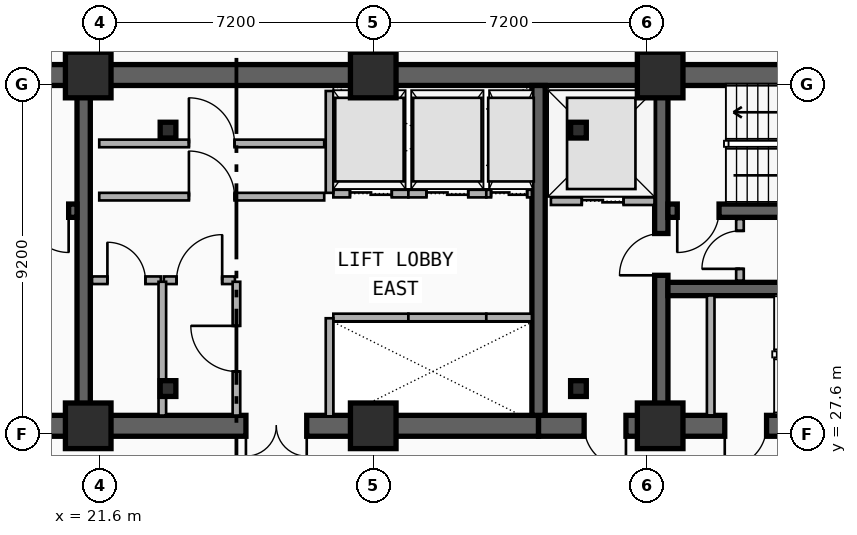
"""IFC4 building model, lengths in metres.
Left out: names, types, materials, properties, quantities, classifications, styles, units other than length and angle.
Written with IfcOpenShell. Run it as: python <this file> out.ifc"""

import sys

from ifc_helpers import new_model, si_unit, direction, frame, frame_2d, origin, origin_2d, place, context, subcontext, project, spatial, rectangle, i_section, extrude, element, fill, save


model = new_model("IFC4")
c1 = context("Model", 3, precision=1e-05, world=origin(), true_north=direction((0.0, 1.0)))
c2 = subcontext(c1, "Body", "Model", "MODEL_VIEW")
j1 = project(units=[si_unit("LENGTHUNIT", "METRE"), si_unit("PLANEANGLEUNIT", "RADIAN")], contexts=[c1])
p1 = place(None, origin())
s1 = spatial("IfcSite", under=j1, at=p1, CompositionType="ELEMENT")
p2 = place(p1, origin())
s2 = spatial("IfcBuilding", under=s1, at=p2, CompositionType="ELEMENT")
p3 = place(p2, frame((0.0, 0.0, 151.9)))
s3 = spatial("IfcBuildingStorey", under=s2, at=p3, CompositionType="ELEMENT", Elevation=151.9)
p4 = place(p3, frame((12.15, 37.05, 0.0), z_axis=(0.0, 0.0, 1.0), x_axis=(1.0, 0.0, 0.0)))
e1 = element("IfcWall", 1, at=p4, inside=s3, PredefinedType="SHEAR", context=c2, shape_type="SweptSolid", body=[
    extrude(rectangle(XDim=33.23, YDim=0.55, at=frame_2d((16.615, 0.0))), origin(), (0.0, 0.0, 1.0), 3.55),
])
p5 = place(p3, frame((21.18, 27.82, 0.0), z_axis=(0.0, 0.0, 1.0), x_axis=(-1.0, 0.0, 0.0)))
e2 = element("IfcWall", 2, at=p5, inside=s3, PredefinedType="SHEAR", context=c2, shape_type="SweptSolid", body=[
    extrude(rectangle(XDim=9.03, YDim=0.55, at=frame_2d((4.515, 0.0))), origin(), (0.0, 0.0, 1.0), 3.55),
])
p6 = place(p5, frame((2.68, 0.0, 0.0)))
e3 = element("IfcOpeningElement", 3, at=p6, cuts=e2, PredefinedType="OPENING", context=c2, shape_type="SweptSolid", body=[
    extrude(rectangle(XDim=1.1, YDim=2.15, at=frame_2d((0.55, 1.075))), frame((0.0, 0.285, 0.0), z_axis=(0.0, -1.0, 0.0), x_axis=(1.0, 0.0, 0.0)), (0.0, 0.0, 1.0), 0.57),
])
p7 = place(p3, frame((33.15, 27.82, 0.0), z_axis=(0.0, 0.0, 1.0), x_axis=(-1.0, 0.0, 0.0)))
e4 = element("IfcWall", 4, at=p7, inside=s3, PredefinedType="SHEAR", context=c2, shape_type="SweptSolid", body=[
    extrude(rectangle(XDim=11.97, YDim=0.55, at=frame_2d((5.985, 0.0))), origin(), (0.0, 0.0, 1.0), 3.55),
])
p8 = place(p7, frame((6.1, 0.0, 0.0)))
e5 = element("IfcOpeningElement", 5, at=p8, cuts=e4, PredefinedType="OPENING", context=c2, shape_type="SweptSolid", body=[
    extrude(rectangle(XDim=1.6, YDim=2.2, at=frame_2d((0.8, 1.1))), frame((0.0, 0.285, 0.0), z_axis=(0.0, -1.0, 0.0), x_axis=(1.0, 0.0, 0.0)), (0.0, 0.0, 1.0), 0.57),
])
p9 = place(p3, frame((45.38, 27.82, 0.0), z_axis=(0.0, 0.0, 1.0), x_axis=(-1.0, 0.0, 0.0)))
e6 = element("IfcWall", 6, at=p9, inside=s3, PredefinedType="SHEAR", context=c2, shape_type="SweptSolid", body=[
    extrude(rectangle(XDim=12.23, YDim=0.55, at=frame_2d((6.115, 0.0))), origin(), (0.0, 0.0, 1.0), 3.55),
])
p10 = place(p9, frame((9.93, 0.0, 0.0)))
e7 = element("IfcOpeningElement", 7, at=p10, cuts=e6, PredefinedType="OPENING", context=c2, shape_type="SweptSolid", body=[
    extrude(rectangle(XDim=1.1, YDim=2.15, at=frame_2d((0.55, 1.075))), frame((0.0, 0.285, 0.0), z_axis=(0.0, -1.0, 0.0), x_axis=(1.0, 0.0, 0.0)), (0.0, 0.0, 1.0), 0.57),
])
p11 = place(p9, frame((6.23, 0.0, 0.0)))
e8 = element("IfcOpeningElement", 8, at=p11, cuts=e6, PredefinedType="OPENING", context=c2, shape_type="SweptSolid", body=[
    extrude(rectangle(XDim=1.1, YDim=2.15, at=frame_2d((0.55, 1.075))), frame((0.0, 0.285, 0.0), z_axis=(0.0, -1.0, 0.0), x_axis=(1.0, 0.0, 0.0)), (0.0, 0.0, 1.0), 0.57),
])
for number, where, z_axis, x_axis in (
    (9, (21.18, 28.095, 0.0), (0.0, 0.0, 1.0), (0.0, 1.0, 0.0)),
    (10, (33.15, 28.095, 0.0), (0.0, 0.0, 1.0), (0.0, 1.0, 0.0)),
):
    element("IfcWall", number, at=place(p3, frame(where, z_axis=z_axis, x_axis=x_axis)), inside=s3, PredefinedType="SHEAR", context=c2, shape_type="SweptSolid", body=[
        extrude(rectangle(XDim=8.68, YDim=0.35, at=frame_2d((4.34, 0.0))), origin(), (0.0, 0.0, 1.0), 3.55),
    ])
p12 = place(p3, frame((36.38, 28.095, 0.0), z_axis=(0.0, 0.0, 1.0), x_axis=(0.0, 1.0, 0.0)))
e11 = element("IfcWall", 11, at=p12, inside=s3, PredefinedType="SHEAR", context=c2, shape_type="SweptSolid", body=[
    extrude(rectangle(XDim=8.68, YDim=0.35, at=frame_2d((4.34, 0.0))), origin(), (0.0, 0.0, 1.0), 3.55),
])
p13 = place(p12, frame((3.685, 0.0, 0.0)))
e12 = element("IfcOpeningElement", 12, at=p13, cuts=e11, PredefinedType="OPENING", context=c2, shape_type="SweptSolid", body=[
    extrude(rectangle(XDim=1.1, YDim=2.15, at=frame_2d((0.55, 1.075))), frame((0.0, 0.185, 0.0), z_axis=(0.0, -1.0, 0.0), x_axis=(1.0, 0.0, 0.0)), (0.0, 0.0, 1.0), 0.37),
])
p14 = place(p3, frame((21.005, 33.48, 0.0), z_axis=(0.0, 0.0, 1.0), x_axis=(-1.0, 0.0, 0.0)))
e13 = element("IfcWall", 13, at=p14, inside=s3, PredefinedType="SHEAR", context=c2, shape_type="SweptSolid", body=[
    extrude(rectangle(XDim=8.58, YDim=0.35, at=frame_2d((4.29, 0.0))), origin(), (0.0, 0.0, 1.0), 3.55),
])
p15 = place(p14, frame((0.22, 0.0, 0.0)))
e14 = element("IfcOpeningElement", 14, at=p15, cuts=e13, PredefinedType="OPENING", context=c2, shape_type="SweptSolid", body=[
    extrude(rectangle(XDim=1.1, YDim=2.15, at=frame_2d((0.55, 1.075))), frame((0.0, 0.185, 0.0), z_axis=(0.0, -1.0, 0.0), x_axis=(1.0, 0.0, 0.0)), (0.0, 0.0, 1.0), 0.37),
])
p16 = place(p3, frame((45.105, 33.48, 0.0), z_axis=(0.0, 0.0, 1.0), x_axis=(-1.0, 0.0, 0.0)))
e15 = element("IfcWall", 15, at=p16, inside=s3, PredefinedType="SHEAR", context=c2, shape_type="SweptSolid", body=[
    extrude(rectangle(XDim=8.55, YDim=0.35, at=frame_2d((4.275, 0.0))), origin(), (0.0, 0.0, 1.0), 3.55),
])
p17 = place(p16, frame((7.205, 0.0, 0.0)))
e16 = element("IfcOpeningElement", 16, at=p17, cuts=e15, PredefinedType="OPENING", context=c2, shape_type="SweptSolid", body=[
    extrude(rectangle(XDim=1.1, YDim=2.15, at=frame_2d((0.55, 1.075))), frame((0.0, 0.185, 0.0), z_axis=(0.0, -1.0, 0.0), x_axis=(1.0, 0.0, 0.0)), (0.0, 0.0, 1.0), 0.37),
])
p18 = place(p3, frame((36.555, 31.42, 0.0), z_axis=(0.0, 0.0, 1.0), x_axis=(1.0, 0.0, 0.0)))
e17 = element("IfcWall", 17, at=p18, inside=s3, PredefinedType="SHEAR", context=c2, shape_type="SweptSolid", body=[
    extrude(rectangle(XDim=8.55, YDim=0.35, at=frame_2d((4.275, 0.0))), origin(), (0.0, 0.0, 1.0), 3.55),
])
for number, where, z_axis, x_axis in (
    (18, (23.4, 28.8, 0.0), (0.0, 0.0, 1.0), (1.0, 0.0, 0.0)),
    (19, (34.2, 28.8, 0.0), (0.0, 0.0, 1.0), (1.0, 0.0, 0.0)),
    (20, (34.2, 35.6, 0.0), (0.0, 0.0, 1.0), (1.0, 0.0, 0.0)),
    (21, (23.4, 35.6, 0.0), (0.0, 0.0, 1.0), (1.0, 0.0, 0.0)),
):
    element("IfcColumn", number, at=place(p3, frame(where, z_axis=z_axis, x_axis=x_axis)), inside=s3, PredefinedType="COLUMN", context=c2, shape_type="SweptSolid", body=[
        extrude(i_section(OverallWidth=0.413, OverallDepth=0.415, WebThickness=0.03, FlangeThickness=0.047, FilletRadius=0.015, at=origin_2d()), origin(), (0.0, 0.0, 1.0), 3.55),
    ])
for number, where, z_axis, x_axis in (
    (22, (21.3, 27.82, 0.0), (0.0, 0.0, 1.0), (1.0, 0.0, 0.0)),
    (23, (21.3, 37.05, 0.0), (0.0, 0.0, 1.0), (1.0, 0.0, 0.0)),
    (24, (28.8, 27.82, 0.0), (0.0, 0.0, 1.0), (1.0, 0.0, 0.0)),
    (25, (28.8, 37.05, 0.0), (0.0, 0.0, 1.0), (1.0, 0.0, 0.0)),
    (26, (36.35, 27.82, 0.0), (0.0, 0.0, 1.0), (1.0, 0.0, 0.0)),
    (27, (36.35, 37.05, 0.0), (0.0, 0.0, 1.0), (1.0, 0.0, 0.0)),
):
    element("IfcColumn", number, at=place(p3, frame(where, z_axis=z_axis, x_axis=x_axis)), inside=s3, PredefinedType="COLUMN", context=c2, shape_type="SweptSolid", body=[
        extrude(rectangle(XDim=1.2, YDim=1.2, at=origin_2d()), origin(), (0.0, 0.0, 1.0), 3.55),
    ])
p19 = place(p3, frame((33.475, 33.73, 0.0), z_axis=(0.0, 0.0, 1.0), x_axis=(1.0, 0.0, 0.0)))
e28 = element("IfcWall", 28, at=p19, inside=s3, PredefinedType="PARTITIONING", context=c2, shape_type="SweptSolid", body=[
    extrude(rectangle(XDim=2.725, YDim=0.2, at=frame_2d((1.362, 0.0))), origin(), (0.0, 0.0, 1.0), 2.36),
])
p20 = place(p19, frame((0.812, 0.0, 0.0)))
e29 = element("IfcOpeningElement", 29, at=p20, cuts=e28, PredefinedType="OPENING", context=c2, shape_type="SweptSolid", body=[
    extrude(rectangle(XDim=1.1, YDim=2.15, at=frame_2d((0.55, 1.075))), frame((0.0, 0.11, 0.0), z_axis=(0.0, -1.0, 0.0), x_axis=(1.0, 0.0, 0.0)), (0.0, 0.0, 1.0), 0.22),
])
p21 = place(p3, frame((27.75, 30.67, 0.0), z_axis=(0.0, 0.0, 1.0), x_axis=(1.0, 0.0, 0.0)))
e30 = element("IfcWall", 30, at=p21, inside=s3, PredefinedType="PARTITIONING", context=c2, shape_type="SweptSolid", body=[
    extrude(rectangle(XDim=1.975, YDim=0.2, at=frame_2d((0.988, 0.0))), origin(), (0.0, 0.0, 1.0), 2.36),
])
p22 = place(p3, frame((27.65, 28.07, 0.0), z_axis=(0.0, 0.0, 1.0), x_axis=(0.0, 1.0, 0.0)))
e31 = element("IfcWall", 31, at=p22, inside=s3, PredefinedType="PARTITIONING", context=c2, shape_type="SweptSolid", body=[
    extrude(rectangle(XDim=2.58, YDim=0.2, at=frame_2d((1.29, 0.0))), origin(), (0.0, 0.0, 1.0), 2.36),
])
p23 = place(p3, frame((29.725, 30.67, 0.0), z_axis=(0.0, 0.0, 1.0), x_axis=(1.0, 0.0, 0.0)))
e32 = element("IfcWall", 32, at=p23, inside=s3, PredefinedType="PARTITIONING", context=c2, shape_type="SweptSolid", body=[
    extrude(rectangle(XDim=2.05, YDim=0.2, at=frame_2d((1.025, 0.0))), origin(), (0.0, 0.0, 1.0), 2.67),
])
p24 = place(p3, frame((31.775, 30.67, 0.0), z_axis=(0.0, 0.0, 1.0), x_axis=(1.0, 0.0, 0.0)))
e33 = element("IfcWall", 33, at=p24, inside=s3, PredefinedType="PARTITIONING", context=c2, shape_type="SweptSolid", body=[
    extrude(rectangle(XDim=1.2, YDim=0.2, at=frame_2d((0.6, 0.0))), origin(), (0.0, 0.0, 1.0), 2.67),
])
p25 = place(p3, frame((27.75, 33.93, 0.0), z_axis=(0.0, 0.0, 1.0), x_axis=(1.0, 0.0, 0.0)))
e34 = element("IfcWall", 34, at=p25, inside=s3, PredefinedType="PARTITIONING", context=c2, shape_type="SweptSolid", body=[
    extrude(rectangle(XDim=1.975, YDim=0.2, at=frame_2d((0.988, 0.0))), origin(), (0.0, 0.0, 1.0), 2.36),
])
p26 = place(p25, frame((0.438, 0.0, 0.0)))
e35 = element("IfcOpeningElement", 35, at=p26, cuts=e34, PredefinedType="OPENING", context=c2, shape_type="SweptSolid", body=[
    extrude(rectangle(XDim=1.1, YDim=2.15, at=frame_2d((0.55, 1.075))), frame((0.0, 0.11, 0.0), z_axis=(0.0, -1.0, 0.0), x_axis=(1.0, 0.0, 0.0)), (0.0, 0.0, 1.0), 0.22),
])
p27 = place(p3, frame((27.65, 33.95, 0.0), z_axis=(0.0, 0.0, 1.0), x_axis=(0.0, 1.0, 0.0)))
e36 = element("IfcWall", 36, at=p27, inside=s3, PredefinedType="PARTITIONING", context=c2, shape_type="SweptSolid", body=[
    extrude(rectangle(XDim=2.68, YDim=0.2, at=frame_2d((1.34, 0.0))), origin(), (0.0, 0.0, 1.0), 2.36),
])
p28 = place(p3, frame((29.725, 33.93, 0.0), z_axis=(0.0, 0.0, 1.0), x_axis=(1.0, 0.0, 0.0)))
e37 = element("IfcWall", 37, at=p28, inside=s3, PredefinedType="PARTITIONING", context=c2, shape_type="SweptSolid", body=[
    extrude(rectangle(XDim=2.05, YDim=0.2, at=frame_2d((1.025, 0.0))), origin(), (0.0, 0.0, 1.0), 3.29),
])
p29 = place(p28, frame((0.475, 0.0, 0.0)))
e38 = element("IfcOpeningElement", 38, at=p29, cuts=e37, PredefinedType="OPENING", context=c2, shape_type="SweptSolid", body=[
    extrude(rectangle(XDim=1.1, YDim=2.15, at=frame_2d((0.55, 1.075))), frame((0.0, 0.11, 0.0), z_axis=(0.0, -1.0, 0.0), x_axis=(1.0, 0.0, 0.0)), (0.0, 0.0, 1.0), 0.22),
])
p30 = place(p3, frame((31.775, 33.93, 0.0), z_axis=(0.0, 0.0, 1.0), x_axis=(1.0, 0.0, 0.0)))
e39 = element("IfcWall", 39, at=p30, inside=s3, PredefinedType="PARTITIONING", context=c2, shape_type="SweptSolid", body=[
    extrude(rectangle(XDim=1.2, YDim=0.2, at=frame_2d((0.6, 0.0))), origin(), (0.0, 0.0, 1.0), 3.29),
])
p31 = place(p30, frame((0.125, 0.0, 0.0)))
e40 = element("IfcOpeningElement", 40, at=p31, cuts=e39, PredefinedType="OPENING", context=c2, shape_type="SweptSolid", body=[
    extrude(rectangle(XDim=0.95, YDim=2.15, at=frame_2d((0.475, 1.075))), frame((0.0, 0.11, 0.0), z_axis=(0.0, -1.0, 0.0), x_axis=(1.0, 0.0, 0.0)), (0.0, 0.0, 1.0), 0.22),
])
p32 = place(p3, frame((37.68, 28.095, 0.0), z_axis=(0.0, 0.0, 1.0), x_axis=(0.0, 1.0, 0.0)))
e41 = element("IfcWall", 41, at=p32, inside=s3, PredefinedType="PARTITIONING", context=c2, shape_type="SweptSolid", body=[
    extrude(rectangle(XDim=3.155, YDim=0.2, at=frame_2d((1.578, 0.0))), origin(), (0.0, 0.0, 1.0), 2.67),
])
p33 = place(p3, frame((38.45, 31.64, 0.0), z_axis=(0.0, 0.0, 1.0), x_axis=(0.0, 1.0, 0.0)))
e42 = element("IfcWall", 42, at=p33, inside=s3, PredefinedType="PARTITIONING", context=c2, shape_type="SweptSolid", body=[
    extrude(rectangle(XDim=1.62, YDim=0.2, at=frame_2d((0.81, 0.0))), origin(), (0.0, 0.0, 1.0), 3.29),
])
p34 = place(p33, frame((0.31, 0.0, 0.0)))
e43 = element("IfcOpeningElement", 43, at=p34, cuts=e42, PredefinedType="OPENING", context=c2, shape_type="SweptSolid", body=[
    extrude(rectangle(XDim=1.0, YDim=2.15, at=frame_2d((0.5, 1.075))), frame((0.0, 0.11, 0.0), z_axis=(0.0, -1.0, 0.0), x_axis=(1.0, 0.0, 0.0)), (0.0, 0.0, 1.0), 0.22),
])
p35 = place(p3, frame((21.4, 31.65, 0.0), z_axis=(0.0, 0.0, 1.0), x_axis=(1.0, 0.0, 0.0)))
e44 = element("IfcWall", 44, at=p35, inside=s3, PredefinedType="PARTITIONING", context=c2, shape_type="SweptSolid", body=[
    extrude(rectangle(XDim=1.81, YDim=0.2, at=frame_2d((0.905, 0.0))), origin(), (0.0, 0.0, 1.0), 2.36),
])
p36 = place(p35, frame((0.405, 0.0, 0.0)))
e45 = element("IfcOpeningElement", 45, at=p36, cuts=e44, PredefinedType="OPENING", context=c2, shape_type="SweptSolid", body=[
    extrude(rectangle(XDim=1.0, YDim=2.15, at=frame_2d((0.5, 1.075))), frame((0.0, 0.11, 0.0), z_axis=(0.0, -1.0, 0.0), x_axis=(1.0, 0.0, 0.0)), (0.0, 0.0, 1.0), 0.22),
])
p37 = place(p3, frame((23.29, 31.65, 0.0), z_axis=(0.0, 0.0, 1.0), x_axis=(1.0, 0.0, 0.0)))
e46 = element("IfcWall", 46, at=p37, inside=s3, PredefinedType="PARTITIONING", context=c2, shape_type="SweptSolid", body=[
    extrude(rectangle(XDim=1.87, YDim=0.2, at=frame_2d((0.935, 0.0))), origin(), (0.0, 0.0, 1.0), 3.29),
])
p38 = place(p37, frame((0.335, 0.0, 0.0)))
e47 = element("IfcOpeningElement", 47, at=p38, cuts=e46, PredefinedType="OPENING", context=c2, shape_type="SweptSolid", body=[
    extrude(rectangle(XDim=1.2, YDim=2.15, at=frame_2d((0.6, 1.075))), frame((0.0, 0.11, 0.0), z_axis=(0.0, -1.0, 0.0), x_axis=(1.0, 0.0, 0.0)), (0.0, 0.0, 1.0), 0.22),
])
p39 = place(p3, frame((21.59, 33.85, 0.0), z_axis=(0.0, 0.0, 1.0), x_axis=(1.0, 0.0, 0.0)))
e48 = element("IfcWall", 48, at=p39, inside=s3, PredefinedType="PARTITIONING", context=c2, shape_type="SweptSolid", body=[
    extrude(rectangle(XDim=5.92, YDim=0.2, at=frame_2d((2.96, 0.0))), origin(), (0.0, 0.0, 1.0), 2.36),
])
p40 = place(p39, frame((2.36, 0.0, 0.0)))
e49 = element("IfcOpeningElement", 49, at=p40, cuts=e48, PredefinedType="OPENING", context=c2, shape_type="SweptSolid", body=[
    extrude(rectangle(XDim=1.2, YDim=2.15, at=frame_2d((0.6, 1.075))), frame((0.0, 0.11, 0.0), z_axis=(0.0, -1.0, 0.0), x_axis=(1.0, 0.0, 0.0)), (0.0, 0.0, 1.0), 0.22),
])
p41 = place(p3, frame((25.2, 28.09, 0.0), z_axis=(0.0, 0.0, 1.0), x_axis=(0.0, 1.0, 0.0)))
e50 = element("IfcWall", 50, at=p41, inside=s3, PredefinedType="PARTITIONING", context=c2, shape_type="SweptSolid", body=[
    extrude(rectangle(XDim=3.52, YDim=0.2, at=frame_2d((1.76, 0.0))), origin(), (0.0, 0.0, 1.0), 2.67),
])
p42 = place(p41, frame((1.16, 0.0, 0.0)))
e51 = element("IfcOpeningElement", 51, at=p42, cuts=e50, PredefinedType="OPENING", context=c2, shape_type="SweptSolid", body=[
    extrude(rectangle(XDim=1.2, YDim=2.15, at=frame_2d((0.6, 1.075))), frame((0.0, 0.11, 0.0), z_axis=(0.0, -1.0, 0.0), x_axis=(1.0, 0.0, 0.0)), (0.0, 0.0, 1.0), 0.22),
])
p43 = place(p3, frame((23.25, 28.09, 0.0), z_axis=(0.0, 0.0, 1.0), x_axis=(0.0, 1.0, 0.0)))
e52 = element("IfcWall", 52, at=p43, inside=s3, PredefinedType="PARTITIONING", context=c2, shape_type="SweptSolid", body=[
    extrude(rectangle(XDim=3.52, YDim=0.2, at=frame_2d((1.76, 0.0))), origin(), (0.0, 0.0, 1.0), 2.67),
])
p44 = place(p3, frame((21.59, 35.25, 0.0), z_axis=(0.0, 0.0, 1.0), x_axis=(1.0, 0.0, 0.0)))
e53 = element("IfcWall", 53, at=p44, inside=s3, PredefinedType="PARTITIONING", context=c2, shape_type="SweptSolid", body=[
    extrude(rectangle(XDim=5.92, YDim=0.2, at=frame_2d((2.96, 0.0))), origin(), (0.0, 0.0, 1.0), 2.36),
])
p45 = place(p44, frame((2.36, 0.0, 0.0)))
e54 = element("IfcOpeningElement", 54, at=p45, cuts=e53, PredefinedType="OPENING", context=c2, shape_type="SweptSolid", body=[
    extrude(rectangle(XDim=1.2, YDim=2.15, at=frame_2d((0.6, 1.075))), frame((0.0, 0.11, 0.0), z_axis=(0.0, -1.0, 0.0), x_axis=(1.0, 0.0, 0.0)), (0.0, 0.0, 1.0), 0.22),
])
p46 = place(p20, origin())
e55 = element("IfcDoor", 55, at=p46, inside=s3, OperationType="DOUBLE_DOOR_SLIDING", PredefinedType="DOOR", context=c2, shape_type="SweptSolid", body=[
    extrude(rectangle(XDim=1.1, YDim=2.15, at=frame_2d((0.55, 1.075))), frame((0.0, 0.025, 0.0), z_axis=(0.0, -1.0, 0.0), x_axis=(1.0, 0.0, 0.0)), (0.0, 0.0, 1.0), 0.05),
])
fill(e29, e55)
p47 = place(p26, origin())
e56 = element("IfcDoor", 56, at=p47, inside=s3, OperationType="DOUBLE_DOOR_SLIDING", PredefinedType="DOOR", context=c2, shape_type="SweptSolid", body=[
    extrude(rectangle(XDim=1.1, YDim=2.15, at=frame_2d((0.55, 1.075))), frame((0.0, 0.025, 0.0), z_axis=(0.0, -1.0, 0.0), x_axis=(1.0, 0.0, 0.0)), (0.0, 0.0, 1.0), 0.05),
])
fill(e35, e56)
p48 = place(p29, origin())
e57 = element("IfcDoor", 57, at=p48, inside=s3, OperationType="DOUBLE_DOOR_SLIDING", PredefinedType="DOOR", context=c2, shape_type="SweptSolid", body=[
    extrude(rectangle(XDim=1.1, YDim=2.15, at=frame_2d((0.55, 1.075))), frame((0.0, 0.025, 0.0), z_axis=(0.0, -1.0, 0.0), x_axis=(1.0, 0.0, 0.0)), (0.0, 0.0, 1.0), 0.05),
])
fill(e38, e57)
p49 = place(p31, origin())
e58 = element("IfcDoor", 58, at=p49, inside=s3, OperationType="DOUBLE_DOOR_SLIDING", PredefinedType="DOOR", context=c2, shape_type="SweptSolid", body=[
    extrude(rectangle(XDim=0.95, YDim=2.15, at=frame_2d((0.475, 1.075))), frame((0.0, 0.025, 0.0), z_axis=(0.0, -1.0, 0.0), x_axis=(1.0, 0.0, 0.0)), (0.0, 0.0, 1.0), 0.05),
])
fill(e40, e58)
p50 = place(p15, origin())
e59 = element("IfcDoor", 59, at=p50, inside=s3, OperationType="SINGLE_SWING_LEFT", PredefinedType="DOOR", context=c2, shape_type="SweptSolid", body=[
    extrude(rectangle(XDim=1.1, YDim=2.15, at=frame_2d((0.55, 1.075))), frame((0.0, 0.025, 0.0), z_axis=(0.0, -1.0, 0.0), x_axis=(1.0, 0.0, 0.0)), (0.0, 0.0, 1.0), 0.05),
])
fill(e14, e59)
p51 = place(p17, origin())
e60 = element("IfcDoor", 60, at=p51, inside=s3, OperationType="SINGLE_SWING_RIGHT", PredefinedType="DOOR", context=c2, shape_type="SweptSolid", body=[
    extrude(rectangle(XDim=1.1, YDim=2.15, at=frame_2d((0.55, 1.075))), frame((0.0, 0.025, 0.0), z_axis=(0.0, -1.0, 0.0), x_axis=(1.0, 0.0, 0.0)), (0.0, 0.0, 1.0), 0.05),
])
fill(e16, e60)
p52 = place(p13, origin())
e61 = element("IfcDoor", 61, at=p52, inside=s3, OperationType="SINGLE_SWING_LEFT", PredefinedType="DOOR", context=c2, shape_type="SweptSolid", body=[
    extrude(rectangle(XDim=1.1, YDim=2.15, at=frame_2d((0.55, 1.075))), frame((0.0, 0.025, 0.0), z_axis=(0.0, -1.0, 0.0), x_axis=(1.0, 0.0, 0.0)), (0.0, 0.0, 1.0), 0.05),
])
fill(e12, e61)
p53 = place(p10, origin())
e62 = element("IfcDoor", 62, at=p53, inside=s3, OperationType="SINGLE_SWING_LEFT", PredefinedType="DOOR", context=c2, shape_type="SweptSolid", body=[
    extrude(rectangle(XDim=1.1, YDim=2.15, at=frame_2d((0.55, 1.075))), frame((0.0, 0.025, 0.0), z_axis=(0.0, -1.0, 0.0), x_axis=(1.0, 0.0, 0.0)), (0.0, 0.0, 1.0), 0.05),
])
fill(e7, e62)
p54 = place(p11, origin())
e63 = element("IfcDoor", 63, at=p54, inside=s3, OperationType="SINGLE_SWING_RIGHT", PredefinedType="DOOR", context=c2, shape_type="SweptSolid", body=[
    extrude(rectangle(XDim=1.1, YDim=2.15, at=frame_2d((0.55, 1.075))), frame((0.0, 0.025, 0.0), z_axis=(0.0, -1.0, 0.0), x_axis=(1.0, 0.0, 0.0)), (0.0, 0.0, 1.0), 0.05),
])
fill(e8, e63)
p55 = place(p8, origin())
e64 = element("IfcDoor", 64, at=p55, inside=s3, OperationType="SINGLE_SWING_LEFT", PredefinedType="DOOR", context=c2, shape_type="SweptSolid", body=[
    extrude(rectangle(XDim=1.6, YDim=2.2, at=frame_2d((0.8, 1.1))), frame((0.0, 0.025, 0.0), z_axis=(0.0, -1.0, 0.0), x_axis=(1.0, 0.0, 0.0)), (0.0, 0.0, 1.0), 0.05),
])
fill(e5, e64)
p56 = place(p34, origin())
e65 = element("IfcDoor", 65, at=p56, inside=s3, OperationType="SINGLE_SWING_LEFT", PredefinedType="DOOR", context=c2, shape_type="SweptSolid", body=[
    extrude(rectangle(XDim=1.0, YDim=2.15, at=frame_2d((0.5, 1.075))), frame((0.0, 0.025, 0.0), z_axis=(0.0, -1.0, 0.0), x_axis=(1.0, 0.0, 0.0)), (0.0, 0.0, 1.0), 0.05),
])
fill(e43, e65)
p57 = place(p36, origin())
e66 = element("IfcDoor", 66, at=p57, inside=s3, OperationType="SINGLE_SWING_LEFT", PredefinedType="DOOR", context=c2, shape_type="SweptSolid", body=[
    extrude(rectangle(XDim=1.0, YDim=2.15, at=frame_2d((0.5, 1.075))), frame((0.0, 0.025, 0.0), z_axis=(0.0, -1.0, 0.0), x_axis=(1.0, 0.0, 0.0)), (0.0, 0.0, 1.0), 0.05),
])
fill(e45, e66)
p58 = place(p38, origin())
e67 = element("IfcDoor", 67, at=p58, inside=s3, OperationType="SINGLE_SWING_RIGHT", PredefinedType="DOOR", context=c2, shape_type="SweptSolid", body=[
    extrude(rectangle(XDim=1.2, YDim=2.15, at=frame_2d((0.6, 1.075))), frame((0.0, 0.025, 0.0), z_axis=(0.0, -1.0, 0.0), x_axis=(1.0, 0.0, 0.0)), (0.0, 0.0, 1.0), 0.05),
])
fill(e47, e67)
p59 = place(p40, origin())
e68 = element("IfcDoor", 68, at=p59, inside=s3, OperationType="SINGLE_SWING_LEFT", PredefinedType="DOOR", context=c2, shape_type="SweptSolid", body=[
    extrude(rectangle(XDim=1.2, YDim=2.15, at=frame_2d((0.6, 1.075))), frame((0.0, 0.025, 0.0), z_axis=(0.0, -1.0, 0.0), x_axis=(1.0, 0.0, 0.0)), (0.0, 0.0, 1.0), 0.05),
])
fill(e49, e68)
p60 = place(p42, origin())
e69 = element("IfcDoor", 69, at=p60, inside=s3, OperationType="SINGLE_SWING_RIGHT", PredefinedType="DOOR", context=c2, shape_type="SweptSolid", body=[
    extrude(rectangle(XDim=1.2, YDim=2.15, at=frame_2d((0.6, 1.075))), frame((0.0, 0.025, 0.0), z_axis=(0.0, -1.0, 0.0), x_axis=(1.0, 0.0, 0.0)), (0.0, 0.0, 1.0), 0.05),
])
fill(e51, e69)
p61 = place(p45, origin())
e70 = element("IfcDoor", 70, at=p61, inside=s3, OperationType="SINGLE_SWING_LEFT", PredefinedType="DOOR", context=c2, shape_type="SweptSolid", body=[
    extrude(rectangle(XDim=1.2, YDim=2.15, at=frame_2d((0.6, 1.075))), frame((0.0, 0.025, 0.0), z_axis=(0.0, -1.0, 0.0), x_axis=(1.0, 0.0, 0.0)), (0.0, 0.0, 1.0), 0.05),
])
fill(e54, e70)
save(model, sys.argv[1])
